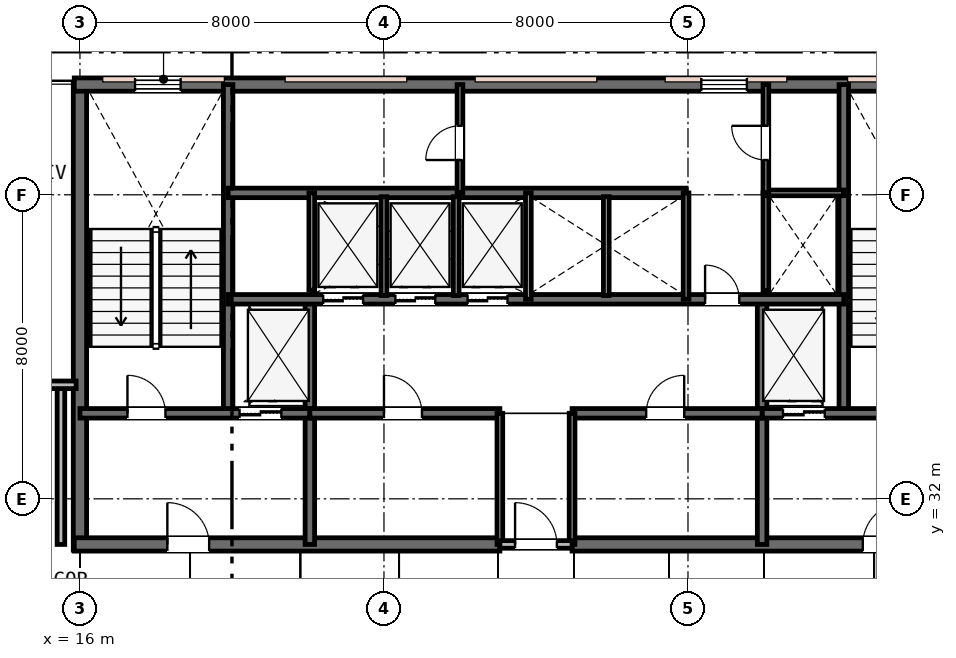
"""IFC4 building model, lengths in metres.
Left out: names, types, materials, properties, quantities, classifications, styles, units other than length and angle.
Written with IfcOpenShell. Run it as: python <this file> out.ifc"""

import sys

from ifc_helpers import new_model, si_unit, direction, frame, frame_2d, origin, place, context, subcontext, project, spatial, rectangle, extrude, element, fill, save


model = new_model("IFC4")
c1 = context("Model", 3, precision=1e-05, world=origin(), true_north=direction((0.0, 1.0)))
c2 = subcontext(c1, "Body", "Model", "MODEL_VIEW")
j1 = project(units=[si_unit("LENGTHUNIT", "METRE"), si_unit("PLANEANGLEUNIT", "RADIAN")], contexts=[c1])
p1 = place(None, origin())
s1 = spatial("IfcSite", under=j1, at=p1, CompositionType="ELEMENT")
p2 = place(p1, origin())
s2 = spatial("IfcBuilding", under=s1, at=p2, CompositionType="ELEMENT")
p3 = place(p2, frame((0.0, 0.0, 168.6)))
s3 = spatial("IfcBuildingStorey", under=s2, at=p3, CompositionType="ELEMENT", Elevation=168.6)
p4 = place(p3, frame((16.0, 30.65, 0.0), z_axis=(0.0, 0.0, 1.0), x_axis=(0.0, 1.0, 0.0)))
e1 = element("IfcWall", 1, at=p4, inside=s3, PredefinedType="SHEAR", context=c2, shape_type="SweptSolid", body=[
    extrude(rectangle(XDim=12.3, YDim=0.35, at=frame_2d((6.15, 0.0))), origin(), (0.0, 0.0, 1.0), 3.6),
])
p5 = place(p3, frame((15.85, 42.9, 0.0), z_axis=(0.0, 0.0, 1.0), x_axis=(1.0, 0.0, 0.0)))
e2 = element("IfcWall", 2, at=p5, inside=s3, PredefinedType="SHEAR", context=c2, shape_type="SweptSolid", body=[
    extrude(rectangle(XDim=24.3, YDim=0.35, at=frame_2d((12.15, 0.0))), origin(), (0.0, 0.0, 1.0), 3.6),
])
p6 = place(p5, frame((1.6, 0.0, 0.95)))
e3 = element("IfcOpeningElement", 3, at=p6, cuts=e2, PredefinedType="OPENING", context=c2, shape_type="SweptSolid", body=[
    extrude(rectangle(XDim=1.2, YDim=1.6, at=frame_2d((0.6, 0.8))), frame((0.0, 0.185, 0.0), z_axis=(0.0, -1.0, 0.0), x_axis=(1.0, 0.0, 0.0)), (0.0, 0.0, 1.0), 0.37),
])
p7 = place(p5, frame((16.5, 0.0, 0.95)))
e4 = element("IfcOpeningElement", 4, at=p7, cuts=e2, PredefinedType="OPENING", context=c2, shape_type="SweptSolid", body=[
    extrude(rectangle(XDim=1.2, YDim=1.6, at=frame_2d((0.6, 0.8))), frame((0.0, 0.185, 0.0), z_axis=(0.0, -1.0, 0.0), x_axis=(1.0, 0.0, 0.0)), (0.0, 0.0, 1.0), 0.37),
])
p8 = place(p5, frame((21.6, 0.0, 0.95)))
e5 = element("IfcOpeningElement", 5, at=p8, cuts=e2, PredefinedType="OPENING", context=c2, shape_type="SweptSolid", body=[
    extrude(rectangle(XDim=1.2, YDim=1.6, at=frame_2d((0.6, 0.8))), frame((0.0, 0.185, 0.0), z_axis=(0.0, -1.0, 0.0), x_axis=(1.0, 0.0, 0.0)), (0.0, 0.0, 1.0), 0.37),
])
p9 = place(p3, frame((15.85, 30.8, 0.0), z_axis=(0.0, 0.0, 1.0), x_axis=(1.0, 0.0, 0.0)))
e6 = element("IfcWall", 6, at=p9, inside=s3, PredefinedType="SHEAR", context=c2, shape_type="SweptSolid", body=[
    extrude(rectangle(XDim=11.2, YDim=0.35, at=frame_2d((5.6, 0.0))), origin(), (0.0, 0.0, 1.0), 3.6),
])
p10 = place(p9, frame((2.45, 0.0, 0.0)))
e7 = element("IfcOpeningElement", 7, at=p10, cuts=e6, PredefinedType="OPENING", context=c2, shape_type="SweptSolid", body=[
    extrude(rectangle(XDim=1.1, YDim=2.15, at=frame_2d((0.55, 1.075))), frame((0.0, 0.185, 0.0), z_axis=(0.0, -1.0, 0.0), x_axis=(1.0, 0.0, 0.0)), (0.0, 0.0, 1.0), 0.37),
])
p11 = place(p3, frame((28.95, 30.8, 0.0), z_axis=(0.0, 0.0, 1.0), x_axis=(1.0, 0.0, 0.0)))
e8 = element("IfcWall", 8, at=p11, inside=s3, PredefinedType="SHEAR", context=c2, shape_type="SweptSolid", body=[
    extrude(rectangle(XDim=11.2, YDim=0.35, at=frame_2d((5.6, 0.0))), origin(), (0.0, 0.0, 1.0), 3.6),
])
p12 = place(p11, frame((7.65, 0.0, 0.0)))
e9 = element("IfcOpeningElement", 9, at=p12, cuts=e8, PredefinedType="OPENING", context=c2, shape_type="SweptSolid", body=[
    extrude(rectangle(XDim=1.1, YDim=2.15, at=frame_2d((0.55, 1.075))), frame((0.0, 0.185, 0.0), z_axis=(0.0, -1.0, 0.0), x_axis=(1.0, 0.0, 0.0)), (0.0, 0.0, 1.0), 0.37),
])
for number, where, z_axis, x_axis in (
    (10, (19.9, 34.25, 0.0), (0.0, 0.0, 1.0), (0.0, 1.0, 0.0)),
    (11, (36.1, 34.25, 0.0), (0.0, 0.0, 1.0), (0.0, 1.0, 0.0)),
):
    element("IfcWall", number, at=place(p3, frame(where, z_axis=z_axis, x_axis=x_axis)), inside=s3, PredefinedType="SHEAR", context=c2, shape_type="SweptSolid", body=[
        extrude(rectangle(XDim=8.65, YDim=0.25, at=frame_2d((4.325, 0.0))), origin(), (0.0, 0.0, 1.0), 3.6),
    ])
for number, where, z_axis, x_axis in (
    (12, (22.05, 30.8, 0.0), (0.0, 0.0, 1.0), (0.0, 1.0, 0.0)),
    (13, (33.95, 30.8, 0.0), (0.0, 0.0, 1.0), (0.0, 1.0, 0.0)),
):
    element("IfcWall", number, at=place(p3, frame(where, z_axis=z_axis, x_axis=x_axis)), inside=s3, PredefinedType="SHEAR", context=c2, shape_type="SweptSolid", body=[
        extrude(rectangle(XDim=6.45, YDim=0.25, at=frame_2d((3.225, 0.0))), origin(), (0.0, 0.0, 1.0), 3.6),
    ])
p13 = place(p3, frame((16.0, 34.25, 0.0), z_axis=(0.0, 0.0, 1.0), x_axis=(1.0, 0.0, 0.0)))
e14 = element("IfcWall", 14, at=p13, inside=s3, PredefinedType="SHEAR", context=c2, shape_type="SweptSolid", body=[
    extrude(rectangle(XDim=6.05, YDim=0.25, at=frame_2d((3.025, 0.0))), origin(), (0.0, 0.0, 1.0), 3.6),
])
p14 = place(p13, frame((1.25, 0.0, 0.0)))
e15 = element("IfcOpeningElement", 15, at=p14, cuts=e14, PredefinedType="OPENING", context=c2, shape_type="SweptSolid", body=[
    extrude(rectangle(XDim=1.0, YDim=2.15, at=frame_2d((0.5, 1.075))), frame((0.0, 0.135, 0.0), z_axis=(0.0, -1.0, 0.0), x_axis=(1.0, 0.0, 0.0)), (0.0, 0.0, 1.0), 0.27),
])
p15 = place(p13, frame((4.2, 0.0, 0.0)))
e16 = element("IfcOpeningElement", 16, at=p15, cuts=e14, PredefinedType="OPENING", context=c2, shape_type="SweptSolid", body=[
    extrude(rectangle(XDim=1.1, YDim=2.15, at=frame_2d((0.55, 1.075))), frame((0.0, 0.135, 0.0), z_axis=(0.0, -1.0, 0.0), x_axis=(1.0, 0.0, 0.0)), (0.0, 0.0, 1.0), 0.27),
])
p16 = place(p3, frame((33.95, 34.25, 0.0), z_axis=(0.0, 0.0, 1.0), x_axis=(1.0, 0.0, 0.0)))
e17 = element("IfcWall", 17, at=p16, inside=s3, PredefinedType="SHEAR", context=c2, shape_type="SweptSolid", body=[
    extrude(rectangle(XDim=6.05, YDim=0.25, at=frame_2d((3.025, 0.0))), origin(), (0.0, 0.0, 1.0), 3.6),
])
p17 = place(p16, frame((3.7, 0.0, 0.0)))
e18 = element("IfcOpeningElement", 18, at=p17, cuts=e17, PredefinedType="OPENING", context=c2, shape_type="SweptSolid", body=[
    extrude(rectangle(XDim=1.0, YDim=2.15, at=frame_2d((0.5, 1.075))), frame((0.0, 0.135, 0.0), z_axis=(0.0, -1.0, 0.0), x_axis=(1.0, 0.0, 0.0)), (0.0, 0.0, 1.0), 0.27),
])
p18 = place(p16, frame((0.55, 0.0, 0.0)))
e19 = element("IfcOpeningElement", 19, at=p18, cuts=e17, PredefinedType="OPENING", context=c2, shape_type="SweptSolid", body=[
    extrude(rectangle(XDim=1.1, YDim=2.15, at=frame_2d((0.55, 1.075))), frame((0.0, 0.135, 0.0), z_axis=(0.0, -1.0, 0.0), x_axis=(1.0, 0.0, 0.0)), (0.0, 0.0, 1.0), 0.27),
])
p19 = place(p3, frame((22.05, 34.25, 0.0), z_axis=(0.0, 0.0, 1.0), x_axis=(1.0, 0.0, 0.0)))
e20 = element("IfcWall", 20, at=p19, inside=s3, PredefinedType="SHEAR", context=c2, shape_type="SweptSolid", body=[
    extrude(rectangle(XDim=5.0, YDim=0.25, at=frame_2d((2.5, 0.0))), origin(), (0.0, 0.0, 1.0), 3.6),
])
p20 = place(p19, frame((1.95, 0.0, 0.0)))
e21 = element("IfcOpeningElement", 21, at=p20, cuts=e20, PredefinedType="OPENING", context=c2, shape_type="SweptSolid", body=[
    extrude(rectangle(XDim=1.0, YDim=2.15, at=frame_2d((0.5, 1.075))), frame((0.0, 0.135, 0.0), z_axis=(0.0, -1.0, 0.0), x_axis=(1.0, 0.0, 0.0)), (0.0, 0.0, 1.0), 0.27),
])
p21 = place(p3, frame((28.95, 34.25, 0.0), z_axis=(0.0, 0.0, 1.0), x_axis=(1.0, 0.0, 0.0)))
e22 = element("IfcWall", 22, at=p21, inside=s3, PredefinedType="SHEAR", context=c2, shape_type="SweptSolid", body=[
    extrude(rectangle(XDim=5.0, YDim=0.25, at=frame_2d((2.5, 0.0))), origin(), (0.0, 0.0, 1.0), 3.6),
])
p22 = place(p21, frame((1.95, 0.0, 0.0)))
e23 = element("IfcOpeningElement", 23, at=p22, cuts=e22, PredefinedType="OPENING", context=c2, shape_type="SweptSolid", body=[
    extrude(rectangle(XDim=1.0, YDim=2.15, at=frame_2d((0.5, 1.075))), frame((0.0, 0.135, 0.0), z_axis=(0.0, -1.0, 0.0), x_axis=(1.0, 0.0, 0.0)), (0.0, 0.0, 1.0), 0.27),
])
p23 = place(p3, frame((19.9, 37.25, 0.0), z_axis=(0.0, 0.0, 1.0), x_axis=(1.0, 0.0, 0.0)))
e24 = element("IfcWall", 24, at=p23, inside=s3, PredefinedType="SHEAR", context=c2, shape_type="SweptSolid", body=[
    extrude(rectangle(XDim=16.2, YDim=0.25, at=frame_2d((8.1, 0.0))), origin(), (0.0, 0.0, 1.0), 3.6),
])
p24 = place(p23, frame((12.55, 0.0, 0.0)))
e25 = element("IfcOpeningElement", 25, at=p24, cuts=e24, PredefinedType="OPENING", context=c2, shape_type="SweptSolid", body=[
    extrude(rectangle(XDim=0.9, YDim=2.15, at=frame_2d((0.45, 1.075))), frame((0.0, 0.135, 0.0), z_axis=(0.0, -1.0, 0.0), x_axis=(1.0, 0.0, 0.0)), (0.0, 0.0, 1.0), 0.27),
])
p25 = place(p23, frame((2.5, 0.0, 0.0)))
e26 = element("IfcOpeningElement", 26, at=p25, cuts=e24, PredefinedType="OPENING", context=c2, shape_type="SweptSolid", body=[
    extrude(rectangle(XDim=1.05, YDim=2.15, at=frame_2d((0.525, 1.075))), frame((0.0, 0.135, 0.0), z_axis=(0.0, -1.0, 0.0), x_axis=(1.0, 0.0, 0.0)), (0.0, 0.0, 1.0), 0.27),
])
p26 = place(p23, frame((4.4, 0.0, 0.0)))
e27 = element("IfcOpeningElement", 27, at=p26, cuts=e24, PredefinedType="OPENING", context=c2, shape_type="SweptSolid", body=[
    extrude(rectangle(XDim=1.05, YDim=2.15, at=frame_2d((0.525, 1.075))), frame((0.0, 0.135, 0.0), z_axis=(0.0, -1.0, 0.0), x_axis=(1.0, 0.0, 0.0)), (0.0, 0.0, 1.0), 0.27),
])
p27 = place(p23, frame((6.3, 0.0, 0.0)))
e28 = element("IfcOpeningElement", 28, at=p27, cuts=e24, PredefinedType="OPENING", context=c2, shape_type="SweptSolid", body=[
    extrude(rectangle(XDim=1.05, YDim=2.15, at=frame_2d((0.525, 1.075))), frame((0.0, 0.135, 0.0), z_axis=(0.0, -1.0, 0.0), x_axis=(1.0, 0.0, 0.0)), (0.0, 0.0, 1.0), 0.27),
])
p28 = place(p3, frame((19.9, 40.05, 0.0), z_axis=(0.0, 0.0, 1.0), x_axis=(1.0, 0.0, 0.0)))
e29 = element("IfcWall", 29, at=p28, inside=s3, PredefinedType="SHEAR", context=c2, shape_type="SweptSolid", body=[
    extrude(rectangle(XDim=12.05, YDim=0.25, at=frame_2d((6.025, 0.0))), origin(), (0.0, 0.0, 1.0), 3.6),
])
for number, where, z_axis, x_axis in (
    (30, (27.05, 30.8, 0.0), (0.0, 0.0, 1.0), (0.0, 1.0, 0.0)),
    (31, (28.95, 30.8, 0.0), (0.0, 0.0, 1.0), (0.0, 1.0, 0.0)),
):
    element("IfcWall", number, at=place(p3, frame(where, z_axis=z_axis, x_axis=x_axis)), inside=s3, PredefinedType="PLUMBINGWALL", context=c2, shape_type="SweptSolid", body=[
        extrude(rectangle(XDim=3.45, YDim=0.15, at=frame_2d((1.725, 0.0))), origin(), (0.0, 0.0, 1.0), 3.07),
    ])
p29 = place(p3, frame((27.05, 30.8, 0.0), z_axis=(0.0, 0.0, 1.0), x_axis=(1.0, 0.0, 0.0)))
e32 = element("IfcWall", 32, at=p29, inside=s3, PredefinedType="PARTITIONING", context=c2, shape_type="SweptSolid", body=[
    extrude(rectangle(XDim=1.9, YDim=0.2, at=frame_2d((0.95, 0.0))), origin(), (0.0, 0.0, 1.0), 3.07),
])
p30 = place(p29, frame((0.4, 0.0, 0.0)))
e33 = element("IfcOpeningElement", 33, at=p30, cuts=e32, PredefinedType="OPENING", context=c2, shape_type="SweptSolid", body=[
    extrude(rectangle(XDim=1.1, YDim=2.15, at=frame_2d((0.55, 1.075))), frame((0.0, 0.11, 0.0), z_axis=(0.0, -1.0, 0.0), x_axis=(1.0, 0.0, 0.0)), (0.0, 0.0, 1.0), 0.22),
])
p31 = place(p3, frame((22.1, 37.49, 0.0), z_axis=(0.0, 0.0, 1.0), x_axis=(0.0, 1.0, 0.0)))
e34 = element("IfcWall", 34, at=p31, inside=s3, PredefinedType="PLUMBINGWALL", context=c2, shape_type="SweptSolid", body=[
    extrude(rectangle(XDim=2.56, YDim=0.15, at=frame_2d((1.28, 0.0))), origin(), (0.0, 0.0, 1.0), 3.33),
])
p32 = place(p3, frame((27.8, 37.25, 0.0), z_axis=(0.0, 0.0, 1.0), x_axis=(0.0, 1.0, 0.0)))
e35 = element("IfcWall", 35, at=p32, inside=s3, PredefinedType="PLUMBINGWALL", context=c2, shape_type="SweptSolid", body=[
    extrude(rectangle(XDim=2.8, YDim=0.15, at=frame_2d((1.4, 0.0))), origin(), (0.0, 0.0, 1.0), 3.33),
])
for number, where, z_axis, x_axis in (
    (36, (24.0, 37.35, 0.0), (0.0, 0.0, 1.0), (0.0, 1.0, 0.0)),
    (37, (25.9, 37.35, 0.0), (0.0, 0.0, 1.0), (0.0, 1.0, 0.0)),
):
    element("IfcWall", number, at=place(p3, frame(where, z_axis=z_axis, x_axis=x_axis)), inside=s3, PredefinedType="PLUMBINGWALL", context=c2, shape_type="SweptSolid", body=[
        extrude(rectangle(XDim=2.6, YDim=0.15, at=frame_2d((1.3, 0.0))), origin(), (0.0, 0.0, 1.0), 3.33),
    ])
p33 = place(p3, frame((31.95, 37.25, 0.0), z_axis=(0.0, 0.0, 1.0), x_axis=(0.0, 1.0, 0.0)))
e38 = element("IfcWall", 38, at=p33, inside=s3, PredefinedType="PLUMBINGWALL", context=c2, shape_type="SweptSolid", body=[
    extrude(rectangle(XDim=2.8, YDim=0.15, at=frame_2d((1.4, 0.0))), origin(), (0.0, 0.0, 1.0), 3.33),
])
p34 = place(p3, frame((29.85, 37.35, 0.0), z_axis=(0.0, 0.0, 1.0), x_axis=(0.0, 1.0, 0.0)))
e39 = element("IfcWall", 39, at=p34, inside=s3, PredefinedType="PLUMBINGWALL", context=c2, shape_type="SweptSolid", body=[
    extrude(rectangle(XDim=2.6, YDim=0.15, at=frame_2d((1.3, 0.0))), origin(), (0.0, 0.0, 1.0), 3.33),
])
p35 = place(p3, frame((34.05, 37.473, 0.0), z_axis=(0.0, 0.0, 1.0), x_axis=(0.0, 1.0, 0.0)))
e40 = element("IfcWall", 40, at=p35, inside=s3, PredefinedType="PLUMBINGWALL", context=c2, shape_type="SweptSolid", body=[
    extrude(rectangle(XDim=2.577, YDim=0.15, at=frame_2d((1.288, 0.0))), origin(), (0.0, 0.0, 1.0), 3.33),
])
p36 = place(p3, frame((34.05, 40.05, 0.0), z_axis=(0.0, 0.0, 1.0), x_axis=(1.0, 0.0, 0.0)))
e41 = element("IfcWall", 41, at=p36, inside=s3, PredefinedType="PARTITIONING", context=c2, shape_type="SweptSolid", body=[
    extrude(rectangle(XDim=2.05, YDim=0.15, at=frame_2d((1.025, 0.0))), origin(), (0.0, 0.0, 1.0), 3.33),
])
p37 = place(p3, frame((34.05, 40.05, 0.0), z_axis=(0.0, 0.0, 1.0), x_axis=(0.0, 1.0, 0.0)))
e42 = element("IfcWall", 42, at=p37, inside=s3, PredefinedType="PARTITIONING", context=c2, shape_type="SweptSolid", body=[
    extrude(rectangle(XDim=2.85, YDim=0.15, at=frame_2d((1.425, 0.0))), origin(), (0.0, 0.0, 1.0), 3.33),
])
p38 = place(p37, frame((0.865, 0.0, 0.0)))
e43 = element("IfcOpeningElement", 43, at=p38, cuts=e42, PredefinedType="OPENING", context=c2, shape_type="SweptSolid", body=[
    extrude(rectangle(XDim=0.9, YDim=2.15, at=frame_2d((0.45, 1.075))), frame((0.0, 0.085, 0.0), z_axis=(0.0, -1.0, 0.0), x_axis=(1.0, 0.0, 0.0)), (0.0, 0.0, 1.0), 0.17),
])
p39 = place(p3, frame((26.0, 40.05, 0.0), z_axis=(0.0, 0.0, 1.0), x_axis=(0.0, 1.0, 0.0)))
e44 = element("IfcWall", 44, at=p39, inside=s3, PredefinedType="PARTITIONING", context=c2, shape_type="SweptSolid", body=[
    extrude(rectangle(XDim=2.85, YDim=0.15, at=frame_2d((1.425, 0.0))), origin(), (0.0, 0.0, 1.0), 3.33),
])
p40 = place(p39, frame((0.865, 0.0, 0.0)))
e45 = element("IfcOpeningElement", 45, at=p40, cuts=e44, PredefinedType="OPENING", context=c2, shape_type="SweptSolid", body=[
    extrude(rectangle(XDim=0.9, YDim=2.15, at=frame_2d((0.45, 1.075))), frame((0.0, 0.085, 0.0), z_axis=(0.0, -1.0, 0.0), x_axis=(1.0, 0.0, 0.0)), (0.0, 0.0, 1.0), 0.17),
])
p41 = place(p3, frame((15.5, 30.8, 0.0), z_axis=(0.0, 0.0, 1.0), x_axis=(0.0, 1.0, 0.0)))
e46 = element("IfcWall", 46, at=p41, inside=s3, PredefinedType="PARTITIONING", context=c2, shape_type="SweptSolid", body=[
    extrude(rectangle(XDim=4.2, YDim=0.2, at=frame_2d((2.1, 0.0))), origin(), (0.0, 0.0, 1.0), 2.92),
])
p42 = place(p3, frame((5.1, 35.0, 0.0), z_axis=(0.0, 0.0, 1.0), x_axis=(1.0, 0.0, 0.0)))
e47 = element("IfcWall", 47, at=p42, inside=s3, PredefinedType="PARTITIONING", context=c2, shape_type="SweptSolid", body=[
    extrude(rectangle(XDim=10.8, YDim=0.2, at=frame_2d((5.4, 0.0))), origin(), (0.0, 0.0, 1.0), 3.02),
])
p43 = place(p42, frame((6.964, 0.0, 0.0)))
e48 = element("IfcOpeningElement", 48, at=p43, cuts=e47, PredefinedType="OPENING", context=c2, shape_type="SweptSolid", body=[
    extrude(rectangle(XDim=0.95, YDim=2.15, at=frame_2d((0.475, 1.075))), frame((0.0, 0.11, 0.0), z_axis=(0.0, -1.0, 0.0), x_axis=(1.0, 0.0, 0.0)), (0.0, 0.0, 1.0), 0.22),
])
p44 = place(p6, origin())
e49 = element("IfcWindow", 49, at=p44, inside=s3, PartitioningType="SINGLE_PANEL", PredefinedType="WINDOW", context=c2, shape_type="SweptSolid", body=[
    extrude(rectangle(XDim=1.2, YDim=1.6, at=frame_2d((0.6, 0.8))), frame((0.0, 0.03, 0.0), z_axis=(0.0, -1.0, 0.0), x_axis=(1.0, 0.0, 0.0)), (0.0, 0.0, 1.0), 0.06),
])
fill(e3, e49)
p45 = place(p7, origin())
e50 = element("IfcWindow", 50, at=p45, inside=s3, PartitioningType="SINGLE_PANEL", PredefinedType="WINDOW", context=c2, shape_type="SweptSolid", body=[
    extrude(rectangle(XDim=1.2, YDim=1.6, at=frame_2d((0.6, 0.8))), frame((0.0, 0.03, 0.0), z_axis=(0.0, -1.0, 0.0), x_axis=(1.0, 0.0, 0.0)), (0.0, 0.0, 1.0), 0.06),
])
fill(e4, e50)
p46 = place(p30, origin())
e51 = element("IfcDoor", 51, at=p46, inside=s3, OperationType="SINGLE_SWING_LEFT", PredefinedType="DOOR", context=c2, shape_type="SweptSolid", body=[
    extrude(rectangle(XDim=1.1, YDim=2.15, at=frame_2d((0.55, 1.075))), frame((0.0, 0.025, 0.0), z_axis=(0.0, -1.0, 0.0), x_axis=(1.0, 0.0, 0.0)), (0.0, 0.0, 1.0), 0.05),
])
fill(e33, e51)
p47 = place(p14, origin())
e52 = element("IfcDoor", 52, at=p47, inside=s3, OperationType="SINGLE_SWING_LEFT", PredefinedType="DOOR", context=c2, shape_type="SweptSolid", body=[
    extrude(rectangle(XDim=1.0, YDim=2.15, at=frame_2d((0.5, 1.075))), frame((0.0, 0.025, 0.0), z_axis=(0.0, -1.0, 0.0), x_axis=(1.0, 0.0, 0.0)), (0.0, 0.0, 1.0), 0.05),
])
fill(e15, e52)
p48 = place(p10, origin())
e53 = element("IfcDoor", 53, at=p48, inside=s3, OperationType="SINGLE_SWING_LEFT", PredefinedType="DOOR", context=c2, shape_type="SweptSolid", body=[
    extrude(rectangle(XDim=1.1, YDim=2.15, at=frame_2d((0.55, 1.075))), frame((0.0, 0.025, 0.0), z_axis=(0.0, -1.0, 0.0), x_axis=(1.0, 0.0, 0.0)), (0.0, 0.0, 1.0), 0.05),
])
fill(e7, e53)
p49 = place(p12, origin())
e54 = element("IfcDoor", 54, at=p49, inside=s3, OperationType="SINGLE_SWING_RIGHT", PredefinedType="DOOR", context=c2, shape_type="SweptSolid", body=[
    extrude(rectangle(XDim=1.1, YDim=2.15, at=frame_2d((0.55, 1.075))), frame((0.0, 0.025, 0.0), z_axis=(0.0, -1.0, 0.0), x_axis=(1.0, 0.0, 0.0)), (0.0, 0.0, 1.0), 0.05),
])
fill(e9, e54)
p50 = place(p20, origin())
e55 = element("IfcDoor", 55, at=p50, inside=s3, OperationType="SINGLE_SWING_LEFT", PredefinedType="DOOR", context=c2, shape_type="SweptSolid", body=[
    extrude(rectangle(XDim=1.0, YDim=2.15, at=frame_2d((0.5, 1.075))), frame((0.0, 0.025, 0.0), z_axis=(0.0, -1.0, 0.0), x_axis=(1.0, 0.0, 0.0)), (0.0, 0.0, 1.0), 0.05),
])
fill(e21, e55)
p51 = place(p22, origin())
e56 = element("IfcDoor", 56, at=p51, inside=s3, OperationType="SINGLE_SWING_RIGHT", PredefinedType="DOOR", context=c2, shape_type="SweptSolid", body=[
    extrude(rectangle(XDim=1.0, YDim=2.15, at=frame_2d((0.5, 1.075))), frame((0.0, 0.025, 0.0), z_axis=(0.0, -1.0, 0.0), x_axis=(1.0, 0.0, 0.0)), (0.0, 0.0, 1.0), 0.05),
])
fill(e23, e56)
p52 = place(p24, origin())
e57 = element("IfcDoor", 57, at=p52, inside=s3, OperationType="SINGLE_SWING_LEFT", PredefinedType="DOOR", context=c2, shape_type="SweptSolid", body=[
    extrude(rectangle(XDim=0.9, YDim=2.15, at=frame_2d((0.45, 1.075))), frame((0.0, 0.025, 0.0), z_axis=(0.0, -1.0, 0.0), x_axis=(1.0, 0.0, 0.0)), (0.0, 0.0, 1.0), 0.05),
])
fill(e25, e57)
p53 = place(p38, origin())
e58 = element("IfcDoor", 58, at=p53, inside=s3, OperationType="SINGLE_SWING_RIGHT", PredefinedType="DOOR", context=c2, shape_type="SweptSolid", body=[
    extrude(rectangle(XDim=0.9, YDim=2.15, at=frame_2d((0.45, 1.075))), frame((0.0, 0.025, 0.0), z_axis=(0.0, -1.0, 0.0), x_axis=(1.0, 0.0, 0.0)), (0.0, 0.0, 1.0), 0.05),
])
fill(e43, e58)
p54 = place(p40, origin())
e59 = element("IfcDoor", 59, at=p54, inside=s3, OperationType="SINGLE_SWING_LEFT", PredefinedType="DOOR", context=c2, shape_type="SweptSolid", body=[
    extrude(rectangle(XDim=0.9, YDim=2.15, at=frame_2d((0.45, 1.075))), frame((0.0, 0.025, 0.0), z_axis=(0.0, -1.0, 0.0), x_axis=(1.0, 0.0, 0.0)), (0.0, 0.0, 1.0), 0.05),
])
fill(e45, e59)
p55 = place(p15, origin())
e60 = element("IfcDoor", 60, at=p55, inside=s3, OperationType="DOUBLE_DOOR_SLIDING", PredefinedType="DOOR", context=c2, shape_type="SweptSolid", body=[
    extrude(rectangle(XDim=1.1, YDim=2.15, at=frame_2d((0.55, 1.075))), frame((0.0, 0.025, 0.0), z_axis=(0.0, -1.0, 0.0), x_axis=(1.0, 0.0, 0.0)), (0.0, 0.0, 1.0), 0.05),
])
fill(e16, e60)
p56 = place(p18, origin())
e61 = element("IfcDoor", 61, at=p56, inside=s3, OperationType="DOUBLE_DOOR_SLIDING", PredefinedType="DOOR", context=c2, shape_type="SweptSolid", body=[
    extrude(rectangle(XDim=1.1, YDim=2.15, at=frame_2d((0.55, 1.075))), frame((0.0, 0.025, 0.0), z_axis=(0.0, -1.0, 0.0), x_axis=(1.0, 0.0, 0.0)), (0.0, 0.0, 1.0), 0.05),
])
fill(e19, e61)
p57 = place(p25, origin())
e62 = element("IfcDoor", 62, at=p57, inside=s3, OperationType="DOUBLE_DOOR_SLIDING", PredefinedType="DOOR", context=c2, shape_type="SweptSolid", body=[
    extrude(rectangle(XDim=1.05, YDim=2.15, at=frame_2d((0.525, 1.075))), frame((0.0, 0.025, 0.0), z_axis=(0.0, -1.0, 0.0), x_axis=(1.0, 0.0, 0.0)), (0.0, 0.0, 1.0), 0.05),
])
fill(e26, e62)
p58 = place(p26, origin())
e63 = element("IfcDoor", 63, at=p58, inside=s3, OperationType="DOUBLE_DOOR_SLIDING", PredefinedType="DOOR", context=c2, shape_type="SweptSolid", body=[
    extrude(rectangle(XDim=1.05, YDim=2.15, at=frame_2d((0.525, 1.075))), frame((0.0, 0.025, 0.0), z_axis=(0.0, -1.0, 0.0), x_axis=(1.0, 0.0, 0.0)), (0.0, 0.0, 1.0), 0.05),
])
fill(e27, e63)
p59 = place(p27, origin())
e64 = element("IfcDoor", 64, at=p59, inside=s3, OperationType="DOUBLE_DOOR_SLIDING", PredefinedType="DOOR", context=c2, shape_type="SweptSolid", body=[
    extrude(rectangle(XDim=1.05, YDim=2.15, at=frame_2d((0.525, 1.075))), frame((0.0, 0.025, 0.0), z_axis=(0.0, -1.0, 0.0), x_axis=(1.0, 0.0, 0.0)), (0.0, 0.0, 1.0), 0.05),
])
fill(e28, e64)
save(model, sys.argv[1])
